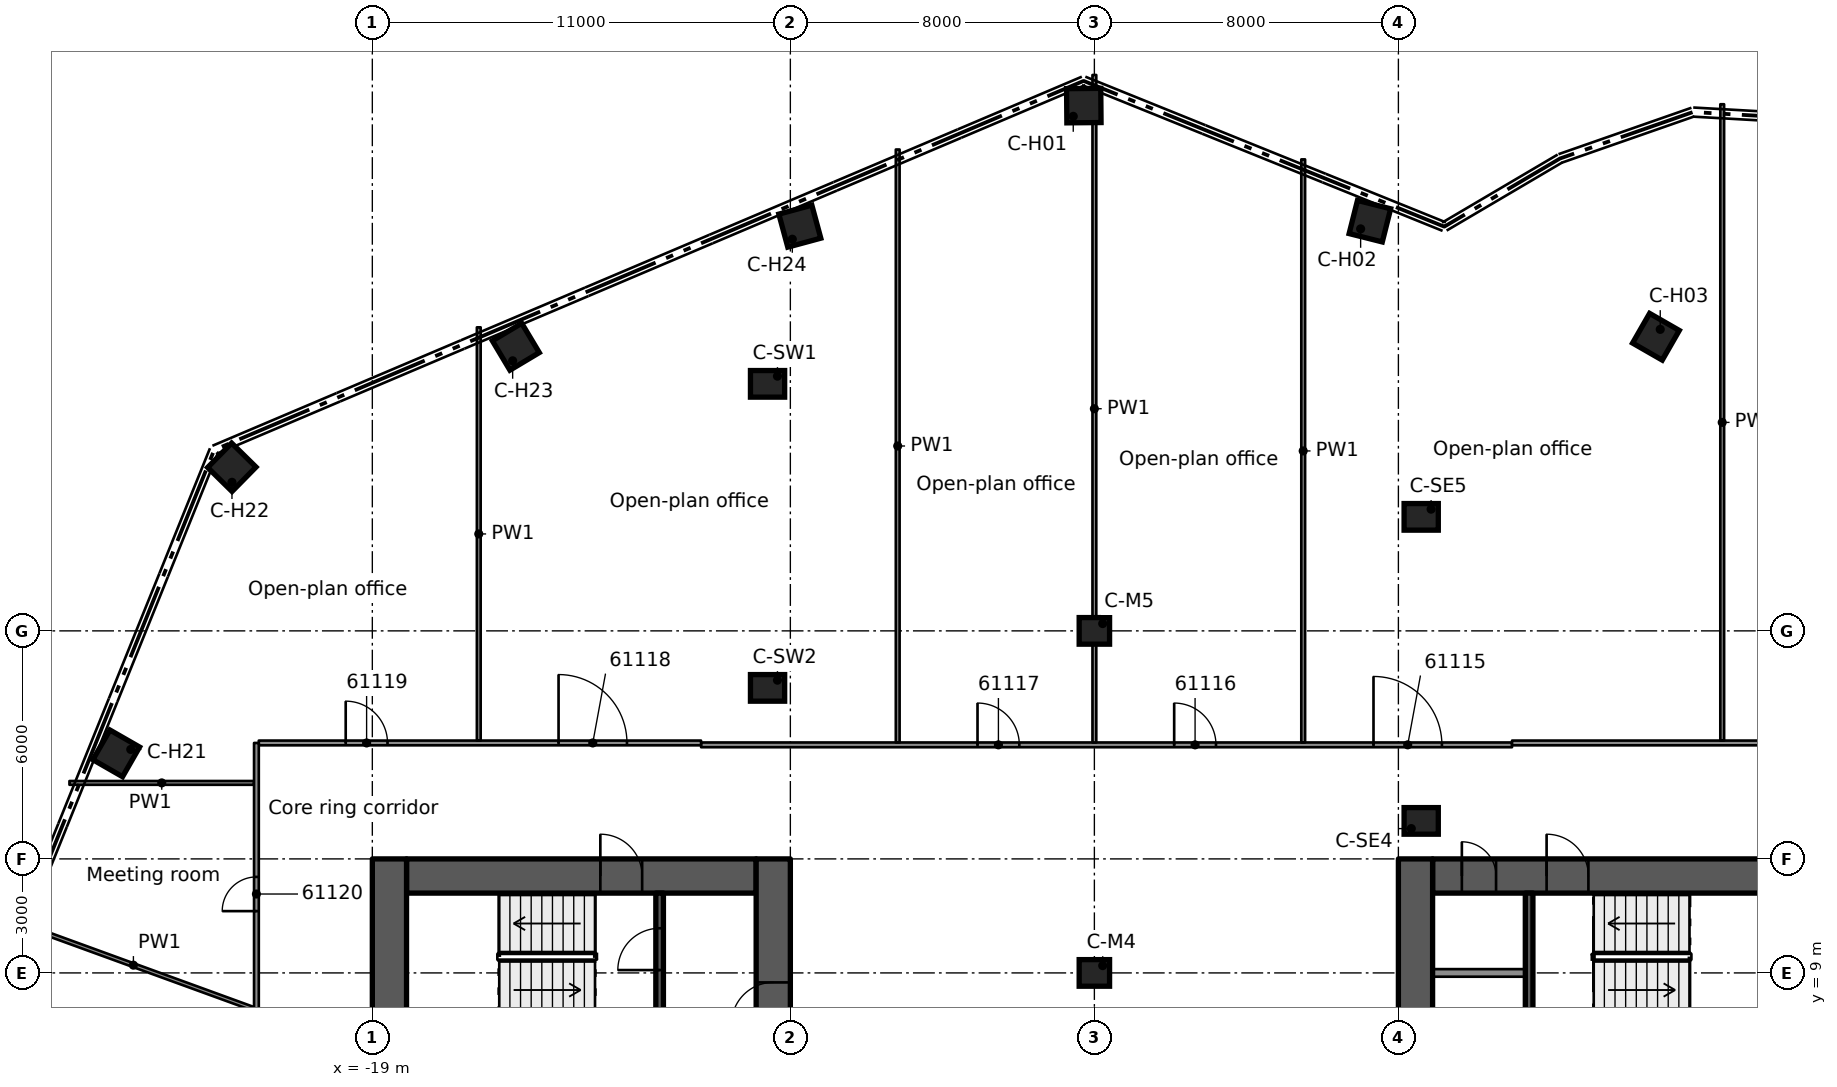
"""IFC4 building model, lengths in metres.
Left out: names, types, materials, properties, quantities, classifications, styles, units other than length and angle.
Written with IfcOpenShell. Run it as: python <this file> out.ifc"""

import sys

from ifc_helpers import new_model, si_unit, direction, frame, frame_2d, origin, origin_2d, place, context, subcontext, project, spatial, rectangle, extrude, element, fill, save


model = new_model("IFC4")
c1 = context("Model", 3, precision=1e-05, world=origin(), true_north=direction((0.0, 1.0)))
c2 = subcontext(c1, "Body", "Model", "MODEL_VIEW")
j1 = project(units=[si_unit("LENGTHUNIT", "METRE"), si_unit("PLANEANGLEUNIT", "RADIAN")], contexts=[c1])
p1 = place(None, origin())
s1 = spatial("IfcSite", under=j1, at=p1, CompositionType="ELEMENT")
p2 = place(p1, origin())
s2 = spatial("IfcBuilding", under=s1, at=p2, CompositionType="ELEMENT")
p3 = place(p2, frame((0.0, 0.0, 296.4)))
s3 = spatial("IfcBuildingStorey", under=s2, at=p3, CompositionType="ELEMENT", Elevation=296.4)
p4 = place(p3, frame((-18.1, 11.55, 0.0), z_axis=(0.0, 0.0, 1.0), x_axis=(1.0, 0.0, 0.0)))
e1 = element("IfcWall", 1, at=p4, inside=s3, PredefinedType="SHEAR", context=c2, shape_type="SweptSolid", body=[
    extrude(rectangle(XDim=9.2, YDim=0.9, at=frame_2d((4.6, 0.0))), origin(), (0.0, 0.0, 1.0), 3.5),
])
p5 = place(p4, frame((5.1, 0.0, 0.0)))
e2 = element("IfcOpeningElement", 2, at=p5, cuts=e1, PredefinedType="OPENING", context=c2, shape_type="SweptSolid", body=[
    extrude(rectangle(XDim=1.1, YDim=2.1, at=frame_2d((0.55, 1.05))), frame((0.0, 0.46, 0.0), z_axis=(0.0, -1.0, 0.0), x_axis=(1.0, 0.0, 0.0)), (0.0, 0.0, 1.0), 0.92),
])
p6 = place(p3, frame((-18.55, -12.0, 0.0), z_axis=(0.0, 0.0, 1.0), x_axis=(0.0, 1.0, 0.0)))
e3 = element("IfcWall", 3, at=p6, inside=s3, PredefinedType="SHEAR", context=c2, shape_type="SweptSolid", body=[
    extrude(rectangle(XDim=24.0, YDim=0.9, at=frame_2d((12.0, 0.0))), origin(), (0.0, 0.0, 1.0), 3.5),
])
p7 = place(p6, frame((10.1, 0.0, 0.0)))
e4 = element("IfcOpeningElement", 4, at=p7, cuts=e3, PredefinedType="OPENING", context=c2, shape_type="SweptSolid", body=[
    extrude(rectangle(XDim=1.8, YDim=2.1, at=frame_2d((0.9, 1.05))), frame((0.0, 0.46, 0.0), z_axis=(0.0, -1.0, 0.0), x_axis=(1.0, 0.0, 0.0)), (0.0, 0.0, 1.0), 0.92),
])
p8 = place(p3, frame((-8.45, -12.0, 0.0), z_axis=(0.0, 0.0, 1.0), x_axis=(0.0, 1.0, 0.0)))
e5 = element("IfcWall", 5, at=p8, inside=s3, PredefinedType="SHEAR", context=c2, shape_type="SweptSolid", body=[
    extrude(rectangle(XDim=24.0, YDim=0.9, at=frame_2d((12.0, 0.0))), origin(), (0.0, 0.0, 1.0), 3.5),
])
p9 = place(p8, frame((9.6, 0.0, 0.0)))
e6 = element("IfcOpeningElement", 6, at=p9, cuts=e5, PredefinedType="OPENING", context=c2, shape_type="SweptSolid", body=[
    extrude(rectangle(XDim=1.8, YDim=2.1, at=frame_2d((0.9, 1.05))), frame((0.0, 0.46, 0.0), z_axis=(0.0, -1.0, 0.0), x_axis=(1.0, 0.0, 0.0)), (0.0, 0.0, 1.0), 0.92),
])
p10 = place(p8, frame((19.65, 0.0, 0.0)))
e7 = element("IfcOpeningElement", 7, at=p10, cuts=e5, PredefinedType="OPENING", context=c2, shape_type="SweptSolid", body=[
    extrude(rectangle(XDim=1.1, YDim=2.1, at=frame_2d((0.55, 1.05))), frame((0.0, 0.46, 0.0), z_axis=(0.0, -1.0, 0.0), x_axis=(1.0, 0.0, 0.0)), (0.0, 0.0, 1.0), 0.92),
])
p11 = place(p3, frame((8.9, 11.55, 0.0), z_axis=(0.0, 0.0, 1.0), x_axis=(1.0, 0.0, 0.0)))
e8 = element("IfcWall", 8, at=p11, inside=s3, PredefinedType="SHEAR", context=c2, shape_type="SweptSolid", body=[
    extrude(rectangle(XDim=9.2, YDim=0.9, at=frame_2d((4.6, 0.0))), origin(), (0.0, 0.0, 1.0), 3.5),
])
p12 = place(p11, frame((3.0, 0.0, 0.0)))
e9 = element("IfcOpeningElement", 9, at=p12, cuts=e8, PredefinedType="OPENING", context=c2, shape_type="SweptSolid", body=[
    extrude(rectangle(XDim=1.1, YDim=2.1, at=frame_2d((0.55, 1.05))), frame((0.0, 0.46, 0.0), z_axis=(0.0, -1.0, 0.0), x_axis=(1.0, 0.0, 0.0)), (0.0, 0.0, 1.0), 0.92),
])
p13 = place(p11, frame((0.77, 0.0, 0.0)))
e10 = element("IfcOpeningElement", 10, at=p13, cuts=e8, PredefinedType="OPENING", context=c2, shape_type="SweptSolid", body=[
    extrude(rectangle(XDim=0.9, YDim=2.1, at=frame_2d((0.45, 1.05))), frame((0.0, 0.46, 0.0), z_axis=(0.0, -1.0, 0.0), x_axis=(1.0, 0.0, 0.0)), (0.0, 0.0, 1.0), 0.92),
])
p14 = place(p3, frame((8.45, -12.0, 0.0), z_axis=(0.0, 0.0, 1.0), x_axis=(0.0, 1.0, 0.0)))
e11 = element("IfcWall", 11, at=p14, inside=s3, PredefinedType="SHEAR", context=c2, shape_type="SweptSolid", body=[
    extrude(rectangle(XDim=24.0, YDim=0.9, at=frame_2d((12.0, 0.0))), origin(), (0.0, 0.0, 1.0), 3.5),
])
p15 = place(p14, frame((12.6, 0.0, 0.0)))
e12 = element("IfcOpeningElement", 12, at=p15, cuts=e11, PredefinedType="OPENING", context=c2, shape_type="SweptSolid", body=[
    extrude(rectangle(XDim=1.8, YDim=2.1, at=frame_2d((0.9, 1.05))), frame((0.0, 0.46, 0.0), z_axis=(0.0, -1.0, 0.0), x_axis=(1.0, 0.0, 0.0)), (0.0, 0.0, 1.0), 0.92),
])
p16 = place(p14, frame((3.25, 0.0, 0.0)))
e13 = element("IfcOpeningElement", 13, at=p16, cuts=e11, PredefinedType="OPENING", context=c2, shape_type="SweptSolid", body=[
    extrude(rectangle(XDim=1.1, YDim=2.1, at=frame_2d((0.55, 1.05))), frame((0.0, 0.46, 0.0), z_axis=(0.0, -1.0, 0.0), x_axis=(1.0, 0.0, 0.0)), (0.0, 0.0, 1.0), 0.92),
])
for number, where, z_axis, x_axis in (
    (14, (-0.278, 31.821, 0.0), (0.0, 0.0, 1.0), (-0.009, 1.0, 0.0)),
    (15, (7.25, 28.78, 0.0), (0.0, 0.0, 1.0), (0.244, 0.97, 0.0)),
    (16, (14.777, 25.739, 0.0), (0.0, 0.0, 1.0), (0.498, 0.867, 0.0)),
    (17, (-25.739, 14.777, 0.0), (0.0, 0.0, 1.0), (-0.867, 0.498, 0.0)),
    (18, (-22.697, 22.305, 0.0), (0.0, 0.0, 1.0), (-0.713, 0.701, 0.0)),
    (19, (-15.224, 25.477, 0.0), (0.0, 0.0, 1.0), (-0.513, 0.858, 0.0)),
    (20, (-7.751, 28.649, 0.0), (0.0, 0.0, 1.0), (-0.261, 0.965, 0.0)),
):
    element("IfcColumn", number, at=place(p3, frame(where, z_axis=z_axis, x_axis=x_axis)), inside=s3, PredefinedType="COLUMN", context=c2, shape_type="SweptSolid", body=[
        extrude(rectangle(XDim=0.9, YDim=0.9, at=origin_2d()), origin(), (0.0, 0.0, 1.0), 3.5),
    ])
for number, where, z_axis, x_axis in (
    (21, (0.0, 9.0, 0.0), (0.0, 0.0, 1.0), (1.0, 0.0, 0.0)),
    (22, (0.0, 18.0, 0.0), (0.0, 0.0, 1.0), (1.0, 0.0, 0.0)),
):
    element("IfcColumn", number, at=place(p3, frame(where, z_axis=z_axis, x_axis=x_axis)), inside=s3, PredefinedType="COLUMN", context=c2, shape_type="SweptSolid", body=[
        extrude(rectangle(XDim=0.8, YDim=0.7, at=origin_2d()), origin(), (0.0, 0.0, 1.0), 3.5),
    ])
for number, where, z_axis, x_axis in (
    (23, (8.6, 13.0, 0.0), (0.0, 0.0, 1.0), (1.0, 0.0, 0.0)),
    (24, (8.6, 21.0, 0.0), (0.0, 0.0, 1.0), (1.0, 0.0, 0.0)),
    (25, (-8.6, 24.5, 0.0), (0.0, 0.0, 1.0), (1.0, 0.0, 0.0)),
    (26, (-8.6, 16.5, 0.0), (0.0, 0.0, 1.0), (1.0, 0.0, 0.0)),
):
    element("IfcColumn", number, at=place(p3, frame(where, z_axis=z_axis, x_axis=x_axis)), inside=s3, PredefinedType="COLUMN", context=c2, shape_type="SweptSolid", body=[
        extrude(rectangle(XDim=0.9, YDim=0.7, at=origin_2d()), origin(), (0.0, 0.0, 1.0), 3.5),
    ])
p17 = place(p3, frame((-11.44, 6.975, 0.0), z_axis=(0.0, 0.0, 1.0), x_axis=(0.0, 1.0, 0.0)))
e27 = element("IfcWall", 27, at=p17, inside=s3, PredefinedType="SOLIDWALL", context=c2, shape_type="SweptSolid", body=[
    extrude(rectangle(XDim=4.125, YDim=0.2, at=frame_2d((2.062, 0.0))), origin(), (0.0, 0.0, 1.0), 3.05),
])
p18 = place(p17, frame((2.1, 0.0, 0.0)))
e28 = element("IfcOpeningElement", 28, at=p18, cuts=e27, PredefinedType="OPENING", context=c2, shape_type="SweptSolid", body=[
    extrude(rectangle(XDim=1.1, YDim=2.1, at=frame_2d((0.55, 1.05))), frame((0.0, 0.11, 0.0), z_axis=(0.0, -1.0, 0.0), x_axis=(1.0, 0.0, 0.0)), (0.0, 0.0, 1.0), 0.22),
])
p19 = place(p3, frame((11.44, 11.1, 0.0), z_axis=(0.0, 0.0, 1.0), x_axis=(0.0, -1.0, 0.0)))
e29 = element("IfcWall", 29, at=p19, inside=s3, PredefinedType="SOLIDWALL", context=c2, shape_type="SweptSolid", body=[
    extrude(rectangle(XDim=4.125, YDim=0.2, at=frame_2d((2.062, 0.0))), origin(), (0.0, 0.0, 1.0), 3.05),
])
p20 = place(p3, frame((8.9, 9.0, 0.0), z_axis=(0.0, 0.0, 1.0), x_axis=(1.0, 0.0, 0.0)))
e30 = element("IfcWall", 30, at=p20, inside=s3, PredefinedType="PARTITIONING", context=c2, shape_type="SweptSolid", body=[
    extrude(rectangle(XDim=2.44, YDim=0.2, at=frame_2d((1.22, 0.0))), origin(), (0.0, 0.0, 1.0), 3.05),
])
p21 = place(p3, frame((-28.444, 10.353, 0.0), z_axis=(0.0, 0.0, 1.0), x_axis=(0.939696849906, -0.342008523689, 0.0)))
e31 = element("IfcWall", 31, at=p21, inside=s3, PredefinedType="PARTITIONING", context=c2, shape_type="SweptSolid", body=[
    extrude(rectangle(XDim=6.719, YDim=0.1, at=frame_2d((3.36, 0.0))), origin(), (0.0, 0.0, 1.0), 3.03),
])
p22 = place(p3, frame((-26.97, 14.0, 0.0), z_axis=(0.0, 0.0, 1.0), x_axis=(1.0, 0.0, 0.0)))
e32 = element("IfcWall", 32, at=p22, inside=s3, PredefinedType="PARTITIONING", context=c2, shape_type="SweptSolid", body=[
    extrude(rectangle(XDim=4.857, YDim=0.1, at=frame_2d((2.428, 0.0))), origin(), (0.0, 0.0, 1.0), 3.03),
])
p23 = place(p3, frame((-10.349, 15.001, 0.0), z_axis=(0.0, 0.0, 1.0), x_axis=(1.0, 0.0, 0.0)))
e33 = element("IfcWall", 33, at=p23, inside=s3, PredefinedType="PARTITIONING", context=c2, shape_type="SweptSolid", body=[
    extrude(rectangle(XDim=21.339, YDim=0.125, at=frame_2d((10.669, 0.0))), origin(), (0.0, 0.0, 1.0), 3.03),
])
p24 = place(p23, frame((17.694, 0.0, 0.0)))
e34 = element("IfcOpeningElement", 34, at=p24, cuts=e33, PredefinedType="OPENING", context=c2, shape_type="SweptSolid", body=[
    extrude(rectangle(XDim=1.8, YDim=2.1, at=frame_2d((0.9, 1.05))), frame((0.0, 0.073, 0.0), z_axis=(0.0, -1.0, 0.0), x_axis=(1.0, 0.0, 0.0)), (0.0, 0.0, 1.0), 0.145),
])
p25 = place(p23, frame((12.449, 0.0, 0.0)))
e35 = element("IfcOpeningElement", 35, at=p25, cuts=e33, PredefinedType="OPENING", context=c2, shape_type="SweptSolid", body=[
    extrude(rectangle(XDim=1.1, YDim=2.1, at=frame_2d((0.55, 1.05))), frame((0.0, 0.073, 0.0), z_axis=(0.0, -1.0, 0.0), x_axis=(1.0, 0.0, 0.0)), (0.0, 0.0, 1.0), 0.145),
])
p26 = place(p23, frame((7.274, 0.0, 0.0)))
e36 = element("IfcOpeningElement", 36, at=p26, cuts=e33, PredefinedType="OPENING", context=c2, shape_type="SweptSolid", body=[
    extrude(rectangle(XDim=1.1, YDim=2.1, at=frame_2d((0.55, 1.05))), frame((0.0, 0.073, 0.0), z_axis=(0.0, -1.0, 0.0), x_axis=(1.0, 0.0, 0.0)), (0.0, 0.0, 1.0), 0.145),
])
p27 = place(p3, frame((-21.988, 15.051, 0.0), z_axis=(0.0, 0.0, 1.0), x_axis=(1.0, 0.0, 0.0)))
e37 = element("IfcWall", 37, at=p27, inside=s3, PredefinedType="PARTITIONING", context=c2, shape_type="SweptSolid", body=[
    extrude(rectangle(XDim=11.638, YDim=0.125, at=frame_2d((5.819, 0.0))), origin(), (0.0, 0.0, 1.0), 3.03),
])
p28 = place(p27, frame((7.888, 0.0, 0.0)))
e38 = element("IfcOpeningElement", 38, at=p28, cuts=e37, PredefinedType="OPENING", context=c2, shape_type="SweptSolid", body=[
    extrude(rectangle(XDim=1.8, YDim=2.1, at=frame_2d((0.9, 1.05))), frame((0.0, 0.073, 0.0), z_axis=(0.0, -1.0, 0.0), x_axis=(1.0, 0.0, 0.0)), (0.0, 0.0, 1.0), 0.145),
])
p29 = place(p27, frame((2.288, 0.0, 0.0)))
e39 = element("IfcOpeningElement", 39, at=p29, cuts=e37, PredefinedType="OPENING", context=c2, shape_type="SweptSolid", body=[
    extrude(rectangle(XDim=1.1, YDim=2.1, at=frame_2d((0.55, 1.05))), frame((0.0, 0.073, 0.0), z_axis=(0.0, -1.0, 0.0), x_axis=(1.0, 0.0, 0.0)), (0.0, 0.0, 1.0), 0.145),
])
p30 = place(p3, frame((10.991, 15.051, 0.0), z_axis=(0.0, 0.0, 1.0), x_axis=(1.0, 0.0, 0.0)))
e40 = element("IfcWall", 40, at=p30, inside=s3, PredefinedType="PARTITIONING", context=c2, shape_type="SweptSolid", body=[
    extrude(rectangle(XDim=10.997, YDim=0.125, at=frame_2d((5.499, 0.0))), origin(), (0.0, 0.0, 1.0), 3.03),
])
p31 = place(p30, frame((7.38, 0.0, 0.0)))
e41 = element("IfcOpeningElement", 41, at=p31, cuts=e40, PredefinedType="OPENING", context=c2, shape_type="SweptSolid", body=[
    extrude(rectangle(XDim=1.8, YDim=2.1, at=frame_2d((0.9, 1.05))), frame((0.0, 0.073, 0.0), z_axis=(0.0, -1.0, 0.0), x_axis=(1.0, 0.0, 0.0)), (0.0, 0.0, 1.0), 0.145),
])
p32 = place(p3, frame((16.521, 15.114, 0.0), z_axis=(0.0, 0.0, 1.0), x_axis=(0.0, 1.0, 0.0)))
e42 = element("IfcWall", 42, at=p32, inside=s3, PredefinedType="PARTITIONING", context=c2, shape_type="SweptSolid", body=[
    extrude(rectangle(XDim=16.743, YDim=0.1, at=frame_2d((8.372, 0.0))), origin(), (0.0, 0.0, 1.0), 2.395),
])
p33 = place(p3, frame((5.495, 15.063, 0.0), z_axis=(0.0, 0.0, 1.0), x_axis=(0.0, 1.0, 0.0)))
e43 = element("IfcWall", 43, at=p33, inside=s3, PredefinedType="PARTITIONING", context=c2, shape_type="SweptSolid", body=[
    extrude(rectangle(XDim=15.343, YDim=0.1, at=frame_2d((7.671, 0.0))), origin(), (0.0, 0.0, 1.0), 3.03),
])
p34 = place(p3, frame((0.0, 15.063, 0.0), z_axis=(0.0, 0.0, 1.0), x_axis=(0.0, 1.0, 0.0)))
e44 = element("IfcWall", 44, at=p34, inside=s3, PredefinedType="PARTITIONING", context=c2, shape_type="SweptSolid", body=[
    extrude(rectangle(XDim=17.564, YDim=0.1, at=frame_2d((8.782, 0.0))), origin(), (0.0, 0.0, 1.0), 3.03),
])
p35 = place(p3, frame((-5.175, 15.063, 0.0), z_axis=(0.0, 0.0, 1.0), x_axis=(0.0, 1.0, 0.0)))
e45 = element("IfcWall", 45, at=p35, inside=s3, PredefinedType="PARTITIONING", context=c2, shape_type="SweptSolid", body=[
    extrude(rectangle(XDim=15.603, YDim=0.1, at=frame_2d((7.802, 0.0))), origin(), (0.0, 0.0, 1.0), 3.03),
])
p36 = place(p3, frame((-16.199, 15.114, 0.0), z_axis=(0.0, 0.0, 1.0), x_axis=(0.0, 1.0, 0.0)))
e46 = element("IfcWall", 46, at=p36, inside=s3, PredefinedType="PARTITIONING", context=c2, shape_type="SweptSolid", body=[
    extrude(rectangle(XDim=10.873, YDim=0.1, at=frame_2d((5.437, 0.0))), origin(), (0.0, 0.0, 1.0), 3.03),
])
p37 = place(p3, frame((-22.05, -15.051, 0.0), z_axis=(0.0, 0.0, 1.0), x_axis=(0.0, 1.0, 0.0)))
e47 = element("IfcWall", 47, at=p37, inside=s3, PredefinedType="PARTITIONING", context=c2, shape_type="SweptSolid", body=[
    extrude(rectangle(XDim=30.102, YDim=0.125, at=frame_2d((15.051, 0.0))), origin(), (0.0, 0.0, 1.0), 3.03),
])
p38 = place(p37, frame((14.625, 0.0, 0.0)))
e48 = element("IfcOpeningElement", 48, at=p38, cuts=e47, PredefinedType="OPENING", context=c2, shape_type="SweptSolid", body=[
    extrude(rectangle(XDim=0.9, YDim=2.1, at=frame_2d((0.45, 1.05))), frame((0.0, 0.073, 0.0), z_axis=(0.0, -1.0, 0.0), x_axis=(1.0, 0.0, 0.0)), (0.0, 0.0, 1.0), 0.145),
])
p39 = place(p37, frame((3.651, 0.0, 0.0)))
e49 = element("IfcOpeningElement", 49, at=p39, cuts=e47, PredefinedType="OPENING", context=c2, shape_type="SweptSolid", body=[
    extrude(rectangle(XDim=0.9, YDim=2.1, at=frame_2d((0.45, 1.05))), frame((0.0, 0.073, 0.0), z_axis=(0.0, -1.0, 0.0), x_axis=(1.0, 0.0, 0.0)), (0.0, 0.0, 1.0), 0.145),
])
p40 = place(p37, frame((25.677, 0.0, 0.0)))
e50 = element("IfcOpeningElement", 50, at=p40, cuts=e47, PredefinedType="OPENING", context=c2, shape_type="SweptSolid", body=[
    extrude(rectangle(XDim=0.9, YDim=2.1, at=frame_2d((0.45, 1.05))), frame((0.0, 0.073, 0.0), z_axis=(0.0, -1.0, 0.0), x_axis=(1.0, 0.0, 0.0)), (0.0, 0.0, 1.0), 0.145),
])
p41 = place(p10, origin())
e51 = element("IfcDoor", 51, at=p41, inside=s3, OperationType="SINGLE_SWING_RIGHT", PredefinedType="DOOR", context=c2, shape_type="SweptSolid", body=[
    extrude(rectangle(XDim=1.1, YDim=2.1, at=frame_2d((0.55, 1.05))), frame((0.0, 0.025, 0.0), z_axis=(0.0, -1.0, 0.0), x_axis=(1.0, 0.0, 0.0)), (0.0, 0.0, 1.0), 0.05),
])
fill(e7, e51)
p42 = place(p5, origin())
e52 = element("IfcDoor", 52, at=p42, inside=s3, OperationType="SINGLE_SWING_RIGHT", PredefinedType="DOOR", context=c2, shape_type="SweptSolid", body=[
    extrude(rectangle(XDim=1.1, YDim=2.1, at=frame_2d((0.55, 1.05))), frame((0.0, 0.025, 0.0), z_axis=(0.0, -1.0, 0.0), x_axis=(1.0, 0.0, 0.0)), (0.0, 0.0, 1.0), 0.05),
])
fill(e2, e52)
p43 = place(p18, origin())
e53 = element("IfcDoor", 53, at=p43, inside=s3, OperationType="SINGLE_SWING_RIGHT", PredefinedType="DOOR", context=c2, shape_type="SweptSolid", body=[
    extrude(rectangle(XDim=1.1, YDim=2.1, at=frame_2d((0.55, 1.05))), frame((0.0, 0.025, 0.0), z_axis=(0.0, -1.0, 0.0), x_axis=(1.0, 0.0, 0.0)), (0.0, 0.0, 1.0), 0.05),
])
fill(e28, e53)
p44 = place(p12, origin())
e54 = element("IfcDoor", 54, at=p44, inside=s3, OperationType="SINGLE_SWING_LEFT", PredefinedType="DOOR", context=c2, shape_type="SweptSolid", body=[
    extrude(rectangle(XDim=1.1, YDim=2.1, at=frame_2d((0.55, 1.05))), frame((0.0, 0.025, 0.0), z_axis=(0.0, -1.0, 0.0), x_axis=(1.0, 0.0, 0.0)), (0.0, 0.0, 1.0), 0.05),
])
fill(e9, e54)
p45 = place(p13, origin())
e55 = element("IfcDoor", 55, at=p45, inside=s3, OperationType="SINGLE_SWING_LEFT", PredefinedType="DOOR", context=c2, shape_type="SweptSolid", body=[
    extrude(rectangle(XDim=0.9, YDim=2.1, at=frame_2d((0.45, 1.05))), frame((0.0, 0.025, 0.0), z_axis=(0.0, -1.0, 0.0), x_axis=(1.0, 0.0, 0.0)), (0.0, 0.0, 1.0), 0.05),
])
fill(e10, e55)
p46 = place(p24, origin())
e56 = element("IfcDoor", 56, at=p46, inside=s3, OperationType="DOUBLE_DOOR_SINGLE_SWING", PredefinedType="DOOR", context=c2, shape_type="SweptSolid", body=[
    extrude(rectangle(XDim=1.8, YDim=2.1, at=frame_2d((0.9, 1.05))), frame((0.0, 0.025, 0.0), z_axis=(0.0, -1.0, 0.0), x_axis=(1.0, 0.0, 0.0)), (0.0, 0.0, 1.0), 0.05),
])
fill(e34, e56)
p47 = place(p25, origin())
e57 = element("IfcDoor", 57, at=p47, inside=s3, OperationType="SINGLE_SWING_RIGHT", PredefinedType="DOOR", context=c2, shape_type="SweptSolid", body=[
    extrude(rectangle(XDim=1.1, YDim=2.1, at=frame_2d((0.55, 1.05))), frame((0.0, 0.025, 0.0), z_axis=(0.0, -1.0, 0.0), x_axis=(1.0, 0.0, 0.0)), (0.0, 0.0, 1.0), 0.05),
])
fill(e35, e57)
p48 = place(p26, origin())
e58 = element("IfcDoor", 58, at=p48, inside=s3, OperationType="SINGLE_SWING_LEFT", PredefinedType="DOOR", context=c2, shape_type="SweptSolid", body=[
    extrude(rectangle(XDim=1.1, YDim=2.1, at=frame_2d((0.55, 1.05))), frame((0.0, 0.025, 0.0), z_axis=(0.0, -1.0, 0.0), x_axis=(1.0, 0.0, 0.0)), (0.0, 0.0, 1.0), 0.05),
])
fill(e36, e58)
p49 = place(p28, origin())
e59 = element("IfcDoor", 59, at=p49, inside=s3, OperationType="DOUBLE_DOOR_SINGLE_SWING", PredefinedType="DOOR", context=c2, shape_type="SweptSolid", body=[
    extrude(rectangle(XDim=1.8, YDim=2.1, at=frame_2d((0.9, 1.05))), frame((0.0, 0.025, 0.0), z_axis=(0.0, -1.0, 0.0), x_axis=(1.0, 0.0, 0.0)), (0.0, 0.0, 1.0), 0.05),
])
fill(e38, e59)
p50 = place(p29, origin())
e60 = element("IfcDoor", 60, at=p50, inside=s3, OperationType="SINGLE_SWING_LEFT", PredefinedType="DOOR", context=c2, shape_type="SweptSolid", body=[
    extrude(rectangle(XDim=1.1, YDim=2.1, at=frame_2d((0.55, 1.05))), frame((0.0, 0.025, 0.0), z_axis=(0.0, -1.0, 0.0), x_axis=(1.0, 0.0, 0.0)), (0.0, 0.0, 1.0), 0.05),
])
fill(e39, e60)
p51 = place(p40, origin())
e61 = element("IfcDoor", 61, at=p51, inside=s3, OperationType="SINGLE_SWING_RIGHT", PredefinedType="DOOR", context=c2, shape_type="SweptSolid", body=[
    extrude(rectangle(XDim=0.9, YDim=2.1, at=frame_2d((0.45, 1.05))), frame((0.0, 0.025, 0.0), z_axis=(0.0, -1.0, 0.0), x_axis=(1.0, 0.0, 0.0)), (0.0, 0.0, 1.0), 0.05),
])
fill(e50, e61)
save(model, sys.argv[1])
